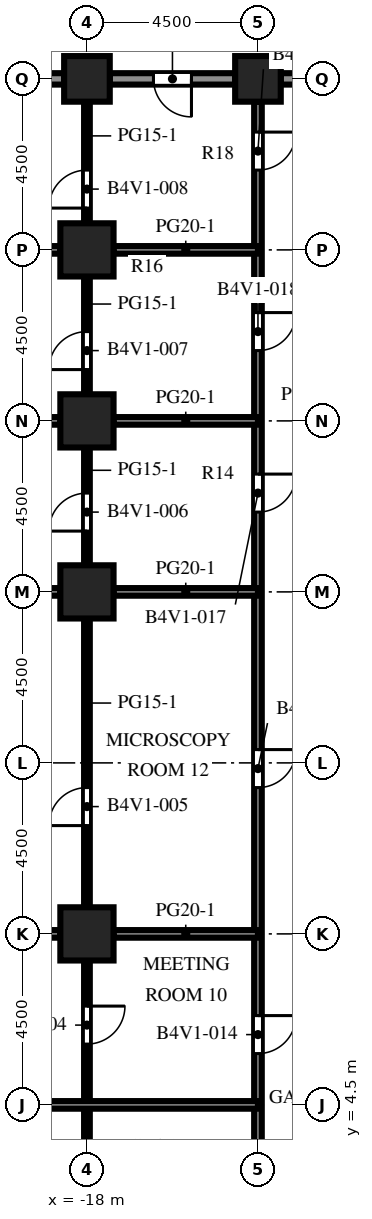
"""IFC4 building model, lengths in metres.
Left out: names, types, materials, properties, quantities, classifications, styles, units other than length and angle.
Written with IfcOpenShell. Run it as: python <this file> out.ifc"""

import sys

from ifc_helpers import new_model, si_unit, direction, frame, frame_2d, origin, origin_2d, place, context, subcontext, project, spatial, rectangle, extrude, element, fill, save


model = new_model("IFC4")
c1 = context("Model", 3, precision=1e-05, world=origin(), true_north=direction((0.0, 1.0)))
c2 = subcontext(c1, "Body", "Model", "MODEL_VIEW")
j1 = project(units=[si_unit("LENGTHUNIT", "METRE"), si_unit("PLANEANGLEUNIT", "RADIAN")], contexts=[c1])
p1 = place(None, origin())
s1 = spatial("IfcSite", under=j1, at=p1, CompositionType="ELEMENT")
p2 = place(p1, origin())
s2 = spatial("IfcBuilding", under=s1, at=p2, CompositionType="ELEMENT")
p3 = place(p2, frame((0.0, 0.0, 129.0)))
s3 = spatial("IfcBuildingStorey", under=s2, at=p3, CompositionType="ELEMENT", Elevation=129.0)
for number, where, z_axis, x_axis in (
    (1, (-18.0, 31.5, 0.0), (0.0, 0.0, 1.0), (1.0, 0.0, 0.0)),
    (2, (-13.5, 31.5, 0.0), (0.0, 0.0, 1.0), (1.0, 0.0, 0.0)),
):
    element("IfcColumn", number, at=place(p3, frame(where, z_axis=z_axis, x_axis=x_axis)), inside=s3, PredefinedType="COLUMN", context=c2, shape_type="SweptSolid", body=[
        extrude(rectangle(XDim=1.2, YDim=1.2, at=origin_2d()), origin(), (0.0, 0.0, 1.0), 4.1),
    ])
for number, where, z_axis, x_axis in (
    (3, (-18.0, 9.0, 0.0), (0.0, 0.0, 1.0), (1.0, 0.0, 0.0)),
    (4, (-18.0, 18.0, 0.0), (0.0, 0.0, 1.0), (1.0, 0.0, 0.0)),
    (5, (-18.0, 22.5, 0.0), (0.0, 0.0, 1.0), (1.0, 0.0, 0.0)),
    (6, (-18.0, 27.0, 0.0), (0.0, 0.0, 1.0), (1.0, 0.0, 0.0)),
):
    element("IfcColumn", number, at=place(p3, frame(where, z_axis=z_axis, x_axis=x_axis)), inside=s3, PredefinedType="COLUMN", context=c2, shape_type="SweptSolid", body=[
        extrude(rectangle(XDim=1.4, YDim=1.4, at=origin_2d()), origin(), (0.0, 0.0, 1.0), 4.1),
    ])
p4 = place(p3, frame((-12.9, 31.5, 0.0), z_axis=(0.0, 0.0, 1.0), x_axis=(1.0, 0.0, 0.0)))
e7 = element("IfcWall", 7, at=p4, inside=s3, PredefinedType="SOLIDWALL", context=c2, shape_type="SweptSolid", body=[
    extrude(rectangle(XDim=3.3, YDim=0.3, at=frame_2d((1.65, 0.0))), origin(), (0.0, 0.0, 1.0), 2.75),
])
p5 = place(p4, frame((0.525, 0.0, 0.8)))
e8 = element("IfcOpeningElement", 8, at=p5, cuts=e7, PredefinedType="OPENING", context=c2, shape_type="SweptSolid", body=[
    extrude(rectangle(XDim=1.2, YDim=1.7, at=frame_2d((0.6, 0.85))), frame((0.0, 0.16, 0.0), z_axis=(0.0, -1.0, 0.0), x_axis=(1.0, 0.0, 0.0)), (0.0, 0.0, 1.0), 0.32),
])
p6 = place(p3, frame((-17.4, 31.5, 0.0), z_axis=(0.0, 0.0, 1.0), x_axis=(1.0, 0.0, 0.0)))
e9 = element("IfcWall", 9, at=p6, inside=s3, PredefinedType="SOLIDWALL", context=c2, shape_type="SweptSolid", body=[
    extrude(rectangle(XDim=3.3, YDim=0.3, at=frame_2d((1.65, 0.0))), origin(), (0.0, 0.0, 1.0), 2.75),
])
p7 = place(p6, frame((1.15, 0.0, 0.0)))
e10 = element("IfcOpeningElement", 10, at=p7, cuts=e9, PredefinedType="OPENING", context=c2, shape_type="SweptSolid", body=[
    extrude(rectangle(XDim=1.0, YDim=2.2, at=frame_2d((0.5, 1.1))), frame((0.0, 0.16, 0.0), z_axis=(0.0, -1.0, 0.0), x_axis=(1.0, 0.0, 0.0)), (0.0, 0.0, 1.0), 0.32),
])
p8 = place(p3, frame((-21.9, 31.5, 0.0), z_axis=(0.0, 0.0, 1.0), x_axis=(1.0, 0.0, 0.0)))
e11 = element("IfcWall", 11, at=p8, inside=s3, PredefinedType="SOLIDWALL", context=c2, shape_type="SweptSolid", body=[
    extrude(rectangle(XDim=3.3, YDim=0.3, at=frame_2d((1.65, 0.0))), origin(), (0.0, 0.0, 1.0), 2.75),
])
p9 = place(p8, frame((0.45, 0.0, 0.8)))
e12 = element("IfcOpeningElement", 12, at=p9, cuts=e11, PredefinedType="OPENING", context=c2, shape_type="SweptSolid", body=[
    extrude(rectangle(XDim=2.4, YDim=1.7, at=frame_2d((1.2, 0.85))), frame((0.0, 0.16, 0.0), z_axis=(0.0, -1.0, 0.0), x_axis=(1.0, 0.0, 0.0)), (0.0, 0.0, 1.0), 0.32),
])
p10 = place(p3, frame((-18.0, 0.7, 0.0), z_axis=(0.0, 0.0, 1.0), x_axis=(0.0, 1.0, 0.0)))
e13 = element("IfcWall", 13, at=p10, inside=s3, PredefinedType="PARTITIONING", context=c2, shape_type="SweptSolid", body=[
    extrude(rectangle(XDim=7.6, YDim=0.15, at=frame_2d((3.8, 0.0))), origin(), (0.0, 0.0, 1.0), 3.65),
])
p11 = place(p10, frame((5.4, 0.0, 0.0)))
e14 = element("IfcOpeningElement", 14, at=p11, cuts=e13, PredefinedType="OPENING", context=c2, shape_type="SweptSolid", body=[
    extrude(rectangle(XDim=1.0, YDim=2.1, at=frame_2d((0.5, 1.05))), frame((0.0, 0.085, 0.0), z_axis=(0.0, -1.0, 0.0), x_axis=(1.0, 0.0, 0.0)), (0.0, 0.0, 1.0), 0.17),
])
p12 = place(p3, frame((-18.0, 9.7, 0.0), z_axis=(0.0, 0.0, 1.0), x_axis=(0.0, 1.0, 0.0)))
e15 = element("IfcWall", 15, at=p12, inside=s3, PredefinedType="PARTITIONING", context=c2, shape_type="SweptSolid", body=[
    extrude(rectangle(XDim=7.6, YDim=0.15, at=frame_2d((3.8, 0.0))), origin(), (0.0, 0.0, 1.0), 3.65),
])
p13 = place(p12, frame((2.15, 0.0, 0.0)))
e16 = element("IfcOpeningElement", 16, at=p13, cuts=e15, PredefinedType="OPENING", context=c2, shape_type="SweptSolid", body=[
    extrude(rectangle(XDim=1.0, YDim=2.1, at=frame_2d((0.5, 1.05))), frame((0.0, 0.085, 0.0), z_axis=(0.0, -1.0, 0.0), x_axis=(1.0, 0.0, 0.0)), (0.0, 0.0, 1.0), 0.17),
])
p14 = place(p3, frame((-18.0, 18.7, 0.0), z_axis=(0.0, 0.0, 1.0), x_axis=(0.0, 1.0, 0.0)))
e17 = element("IfcWall", 17, at=p14, inside=s3, PredefinedType="PARTITIONING", context=c2, shape_type="SweptSolid", body=[
    extrude(rectangle(XDim=3.1, YDim=0.15, at=frame_2d((1.55, 0.0))), origin(), (0.0, 0.0, 1.0), 3.65),
])
p15 = place(p14, frame((0.9, 0.0, 0.0)))
e18 = element("IfcOpeningElement", 18, at=p15, cuts=e17, PredefinedType="OPENING", context=c2, shape_type="SweptSolid", body=[
    extrude(rectangle(XDim=1.0, YDim=2.1, at=frame_2d((0.5, 1.05))), frame((0.0, 0.085, 0.0), z_axis=(0.0, -1.0, 0.0), x_axis=(1.0, 0.0, 0.0)), (0.0, 0.0, 1.0), 0.17),
])
p16 = place(p3, frame((-18.0, 23.2, 0.0), z_axis=(0.0, 0.0, 1.0), x_axis=(0.0, 1.0, 0.0)))
e19 = element("IfcWall", 19, at=p16, inside=s3, PredefinedType="PARTITIONING", context=c2, shape_type="SweptSolid", body=[
    extrude(rectangle(XDim=3.1, YDim=0.15, at=frame_2d((1.55, 0.0))), origin(), (0.0, 0.0, 1.0), 3.65),
])
p17 = place(p16, frame((0.65, 0.0, 0.0)))
e20 = element("IfcOpeningElement", 20, at=p17, cuts=e19, PredefinedType="OPENING", context=c2, shape_type="SweptSolid", body=[
    extrude(rectangle(XDim=1.0, YDim=2.1, at=frame_2d((0.5, 1.05))), frame((0.0, 0.085, 0.0), z_axis=(0.0, -1.0, 0.0), x_axis=(1.0, 0.0, 0.0)), (0.0, 0.0, 1.0), 0.17),
])
p18 = place(p3, frame((-18.0, 27.7, 0.0), z_axis=(0.0, 0.0, 1.0), x_axis=(0.0, 1.0, 0.0)))
e21 = element("IfcWall", 21, at=p18, inside=s3, PredefinedType="PARTITIONING", context=c2, shape_type="SweptSolid", body=[
    extrude(rectangle(XDim=3.2, YDim=0.15, at=frame_2d((1.6, 0.0))), origin(), (0.0, 0.0, 1.0), 3.65),
])
p19 = place(p18, frame((0.4, 0.0, 0.0)))
e22 = element("IfcOpeningElement", 22, at=p19, cuts=e21, PredefinedType="OPENING", context=c2, shape_type="SweptSolid", body=[
    extrude(rectangle(XDim=1.0, YDim=2.1, at=frame_2d((0.5, 1.05))), frame((0.0, 0.085, 0.0), z_axis=(0.0, -1.0, 0.0), x_axis=(1.0, 0.0, 0.0)), (0.0, 0.0, 1.0), 0.17),
])
p20 = place(p3, frame((-13.5, -21.9, 0.0), z_axis=(0.0, 0.0, 1.0), x_axis=(0.0, 1.0, 0.0)))
e23 = element("IfcWall", 23, at=p20, inside=s3, PredefinedType="PARTITIONING", context=c2, shape_type="SweptSolid", body=[
    extrude(rectangle(XDim=52.8, YDim=0.2, at=frame_2d((26.4, 0.0))), origin(), (0.0, 0.0, 1.0), 3.65),
])
p21 = place(p20, frame((3.25, 0.0, 0.0)))
e24 = element("IfcOpeningElement", 24, at=p21, cuts=e23, PredefinedType="OPENING", context=c2, shape_type="SweptSolid", body=[
    extrude(rectangle(XDim=1.0, YDim=2.1, at=frame_2d((0.5, 1.05))), frame((0.0, 0.11, 0.0), z_axis=(0.0, -1.0, 0.0), x_axis=(1.0, 0.0, 0.0)), (0.0, 0.0, 1.0), 0.22),
])
p22 = place(p20, frame((10.0, 0.0, 0.0)))
e25 = element("IfcOpeningElement", 25, at=p22, cuts=e23, PredefinedType="OPENING", context=c2, shape_type="SweptSolid", body=[
    extrude(rectangle(XDim=1.0, YDim=2.1, at=frame_2d((0.5, 1.05))), frame((0.0, 0.11, 0.0), z_axis=(0.0, -1.0, 0.0), x_axis=(1.0, 0.0, 0.0)), (0.0, 0.0, 1.0), 0.22),
])
p23 = place(p20, frame((21.0, 0.0, 0.0)))
e26 = element("IfcOpeningElement", 26, at=p23, cuts=e23, PredefinedType="OPENING", context=c2, shape_type="SweptSolid", body=[
    extrude(rectangle(XDim=1.0, YDim=2.1, at=frame_2d((0.5, 1.05))), frame((0.0, 0.11, 0.0), z_axis=(0.0, -1.0, 0.0), x_axis=(1.0, 0.0, 0.0)), (0.0, 0.0, 1.0), 0.22),
])
p24 = place(p20, frame((27.75, 0.0, 0.0)))
e27 = element("IfcOpeningElement", 27, at=p24, cuts=e23, PredefinedType="OPENING", context=c2, shape_type="SweptSolid", body=[
    extrude(rectangle(XDim=1.0, YDim=2.1, at=frame_2d((0.5, 1.05))), frame((0.0, 0.11, 0.0), z_axis=(0.0, -1.0, 0.0), x_axis=(1.0, 0.0, 0.0)), (0.0, 0.0, 1.0), 0.22),
])
p25 = place(p20, frame((34.75, 0.0, 0.0)))
e28 = element("IfcOpeningElement", 28, at=p25, cuts=e23, PredefinedType="OPENING", context=c2, shape_type="SweptSolid", body=[
    extrude(rectangle(XDim=1.0, YDim=2.1, at=frame_2d((0.5, 1.05))), frame((0.0, 0.11, 0.0), z_axis=(0.0, -1.0, 0.0), x_axis=(1.0, 0.0, 0.0)), (0.0, 0.0, 1.0), 0.22),
])
p26 = place(p20, frame((42.0, 0.0, 0.0)))
e29 = element("IfcOpeningElement", 29, at=p26, cuts=e23, PredefinedType="OPENING", context=c2, shape_type="SweptSolid", body=[
    extrude(rectangle(XDim=1.0, YDim=2.1, at=frame_2d((0.5, 1.05))), frame((0.0, 0.11, 0.0), z_axis=(0.0, -1.0, 0.0), x_axis=(1.0, 0.0, 0.0)), (0.0, 0.0, 1.0), 0.22),
])
p27 = place(p20, frame((46.25, 0.0, 0.0)))
e30 = element("IfcOpeningElement", 30, at=p27, cuts=e23, PredefinedType="OPENING", context=c2, shape_type="SweptSolid", body=[
    extrude(rectangle(XDim=1.0, YDim=2.1, at=frame_2d((0.5, 1.05))), frame((0.0, 0.11, 0.0), z_axis=(0.0, -1.0, 0.0), x_axis=(1.0, 0.0, 0.0)), (0.0, 0.0, 1.0), 0.22),
])
p28 = place(p20, frame((51.0, 0.0, 0.0)))
e31 = element("IfcOpeningElement", 31, at=p28, cuts=e23, PredefinedType="OPENING", context=c2, shape_type="SweptSolid", body=[
    extrude(rectangle(XDim=1.0, YDim=2.1, at=frame_2d((0.5, 1.05))), frame((0.0, 0.11, 0.0), z_axis=(0.0, -1.0, 0.0), x_axis=(1.0, 0.0, 0.0)), (0.0, 0.0, 1.0), 0.22),
])
p29 = place(p3, frame((-26.4, 4.5, 0.0), z_axis=(0.0, 0.0, 1.0), x_axis=(1.0, 0.0, 0.0)))
e32 = element("IfcWall", 32, at=p29, inside=s3, PredefinedType="PARTITIONING", context=c2, shape_type="SweptSolid", body=[
    extrude(rectangle(XDim=12.9, YDim=0.2, at=frame_2d((6.45, 0.0))), origin(), (0.0, 0.0, 1.0), 3.65),
])
p30 = place(p3, frame((-26.4, 9.0, 0.0), z_axis=(0.0, 0.0, 1.0), x_axis=(1.0, 0.0, 0.0)))
e33 = element("IfcWall", 33, at=p30, inside=s3, PredefinedType="PARTITIONING", context=c2, shape_type="SweptSolid", body=[
    extrude(rectangle(XDim=7.7, YDim=0.2, at=frame_2d((3.85, 0.0))), origin(), (0.0, 0.0, 1.0), 3.65),
])
p31 = place(p3, frame((-17.3, 9.0, 0.0), z_axis=(0.0, 0.0, 1.0), x_axis=(1.0, 0.0, 0.0)))
e34 = element("IfcWall", 34, at=p31, inside=s3, PredefinedType="PARTITIONING", context=c2, shape_type="SweptSolid", body=[
    extrude(rectangle(XDim=3.8, YDim=0.2, at=frame_2d((1.9, 0.0))), origin(), (0.0, 0.0, 1.0), 3.65),
])
p32 = place(p3, frame((-26.4, 18.0, 0.0), z_axis=(0.0, 0.0, 1.0), x_axis=(1.0, 0.0, 0.0)))
e35 = element("IfcWall", 35, at=p32, inside=s3, PredefinedType="PARTITIONING", context=c2, shape_type="SweptSolid", body=[
    extrude(rectangle(XDim=7.7, YDim=0.2, at=frame_2d((3.85, 0.0))), origin(), (0.0, 0.0, 1.0), 3.65),
])
p33 = place(p3, frame((-17.3, 18.0, 0.0), z_axis=(0.0, 0.0, 1.0), x_axis=(1.0, 0.0, 0.0)))
e36 = element("IfcWall", 36, at=p33, inside=s3, PredefinedType="PARTITIONING", context=c2, shape_type="SweptSolid", body=[
    extrude(rectangle(XDim=3.8, YDim=0.2, at=frame_2d((1.9, 0.0))), origin(), (0.0, 0.0, 1.0), 3.65),
])
p34 = place(p3, frame((-26.4, 22.5, 0.0), z_axis=(0.0, 0.0, 1.0), x_axis=(1.0, 0.0, 0.0)))
e37 = element("IfcWall", 37, at=p34, inside=s3, PredefinedType="PARTITIONING", context=c2, shape_type="SweptSolid", body=[
    extrude(rectangle(XDim=7.7, YDim=0.2, at=frame_2d((3.85, 0.0))), origin(), (0.0, 0.0, 1.0), 3.65),
])
p35 = place(p3, frame((-17.3, 22.5, 0.0), z_axis=(0.0, 0.0, 1.0), x_axis=(1.0, 0.0, 0.0)))
e38 = element("IfcWall", 38, at=p35, inside=s3, PredefinedType="PARTITIONING", context=c2, shape_type="SweptSolid", body=[
    extrude(rectangle(XDim=3.8, YDim=0.2, at=frame_2d((1.9, 0.0))), origin(), (0.0, 0.0, 1.0), 3.65),
])
p36 = place(p3, frame((-26.4, 27.0, 0.0), z_axis=(0.0, 0.0, 1.0), x_axis=(1.0, 0.0, 0.0)))
e39 = element("IfcWall", 39, at=p36, inside=s3, PredefinedType="PARTITIONING", context=c2, shape_type="SweptSolid", body=[
    extrude(rectangle(XDim=7.7, YDim=0.2, at=frame_2d((3.85, 0.0))), origin(), (0.0, 0.0, 1.0), 3.65),
])
p37 = place(p3, frame((-17.3, 27.0, 0.0), z_axis=(0.0, 0.0, 1.0), x_axis=(1.0, 0.0, 0.0)))
e40 = element("IfcWall", 40, at=p37, inside=s3, PredefinedType="PARTITIONING", context=c2, shape_type="SweptSolid", body=[
    extrude(rectangle(XDim=3.8, YDim=0.2, at=frame_2d((1.9, 0.0))), origin(), (0.0, 0.0, 1.0), 3.65),
])
p38 = place(p7, origin())
e41 = element("IfcDoor", 41, at=p38, inside=s3, OperationType="SINGLE_SWING_RIGHT", PredefinedType="DOOR", context=c2, shape_type="SweptSolid", body=[
    extrude(rectangle(XDim=1.0, YDim=2.2, at=frame_2d((0.5, 1.1))), frame((0.0, 0.025, 0.0), z_axis=(0.0, -1.0, 0.0), x_axis=(1.0, 0.0, 0.0)), (0.0, 0.0, 1.0), 0.05),
])
fill(e10, e41)
p39 = place(p11, origin())
e42 = element("IfcDoor", 42, at=p39, inside=s3, OperationType="SINGLE_SWING_RIGHT", PredefinedType="DOOR", context=c2, shape_type="SweptSolid", body=[
    extrude(rectangle(XDim=1.0, YDim=2.1, at=frame_2d((0.5, 1.05))), frame((0.0, 0.025, 0.0), z_axis=(0.0, -1.0, 0.0), x_axis=(1.0, 0.0, 0.0)), (0.0, 0.0, 1.0), 0.05),
])
fill(e14, e42)
p40 = place(p13, origin())
e43 = element("IfcDoor", 43, at=p40, inside=s3, OperationType="SINGLE_SWING_LEFT", PredefinedType="DOOR", context=c2, shape_type="SweptSolid", body=[
    extrude(rectangle(XDim=1.0, YDim=2.1, at=frame_2d((0.5, 1.05))), frame((0.0, 0.025, 0.0), z_axis=(0.0, -1.0, 0.0), x_axis=(1.0, 0.0, 0.0)), (0.0, 0.0, 1.0), 0.05),
])
fill(e16, e43)
p41 = place(p15, origin())
e44 = element("IfcDoor", 44, at=p41, inside=s3, OperationType="SINGLE_SWING_LEFT", PredefinedType="DOOR", context=c2, shape_type="SweptSolid", body=[
    extrude(rectangle(XDim=1.0, YDim=2.1, at=frame_2d((0.5, 1.05))), frame((0.0, 0.025, 0.0), z_axis=(0.0, -1.0, 0.0), x_axis=(1.0, 0.0, 0.0)), (0.0, 0.0, 1.0), 0.05),
])
fill(e18, e44)
p42 = place(p17, origin())
e45 = element("IfcDoor", 45, at=p42, inside=s3, OperationType="SINGLE_SWING_LEFT", PredefinedType="DOOR", context=c2, shape_type="SweptSolid", body=[
    extrude(rectangle(XDim=1.0, YDim=2.1, at=frame_2d((0.5, 1.05))), frame((0.0, 0.025, 0.0), z_axis=(0.0, -1.0, 0.0), x_axis=(1.0, 0.0, 0.0)), (0.0, 0.0, 1.0), 0.05),
])
fill(e20, e45)
p43 = place(p19, origin())
e46 = element("IfcDoor", 46, at=p43, inside=s3, OperationType="SINGLE_SWING_LEFT", PredefinedType="DOOR", context=c2, shape_type="SweptSolid", body=[
    extrude(rectangle(XDim=1.0, YDim=2.1, at=frame_2d((0.5, 1.05))), frame((0.0, 0.025, 0.0), z_axis=(0.0, -1.0, 0.0), x_axis=(1.0, 0.0, 0.0)), (0.0, 0.0, 1.0), 0.05),
])
fill(e22, e46)
p44 = place(p24, origin())
e47 = element("IfcDoor", 47, at=p44, inside=s3, OperationType="SINGLE_SWING_RIGHT", PredefinedType="DOOR", context=c2, shape_type="SweptSolid", body=[
    extrude(rectangle(XDim=1.0, YDim=2.1, at=frame_2d((0.5, 1.05))), frame((0.0, 0.025, 0.0), z_axis=(0.0, -1.0, 0.0), x_axis=(1.0, 0.0, 0.0)), (0.0, 0.0, 1.0), 0.05),
])
fill(e27, e47)
p45 = place(p25, origin())
e48 = element("IfcDoor", 48, at=p45, inside=s3, OperationType="SINGLE_SWING_RIGHT", PredefinedType="DOOR", context=c2, shape_type="SweptSolid", body=[
    extrude(rectangle(XDim=1.0, YDim=2.1, at=frame_2d((0.5, 1.05))), frame((0.0, 0.025, 0.0), z_axis=(0.0, -1.0, 0.0), x_axis=(1.0, 0.0, 0.0)), (0.0, 0.0, 1.0), 0.05),
])
fill(e28, e48)
p46 = place(p26, origin())
e49 = element("IfcDoor", 49, at=p46, inside=s3, OperationType="SINGLE_SWING_RIGHT", PredefinedType="DOOR", context=c2, shape_type="SweptSolid", body=[
    extrude(rectangle(XDim=1.0, YDim=2.1, at=frame_2d((0.5, 1.05))), frame((0.0, 0.025, 0.0), z_axis=(0.0, -1.0, 0.0), x_axis=(1.0, 0.0, 0.0)), (0.0, 0.0, 1.0), 0.05),
])
fill(e29, e49)
p47 = place(p27, origin())
e50 = element("IfcDoor", 50, at=p47, inside=s3, OperationType="SINGLE_SWING_RIGHT", PredefinedType="DOOR", context=c2, shape_type="SweptSolid", body=[
    extrude(rectangle(XDim=1.0, YDim=2.1, at=frame_2d((0.5, 1.05))), frame((0.0, 0.025, 0.0), z_axis=(0.0, -1.0, 0.0), x_axis=(1.0, 0.0, 0.0)), (0.0, 0.0, 1.0), 0.05),
])
fill(e30, e50)
p48 = place(p28, origin())
e51 = element("IfcDoor", 51, at=p48, inside=s3, OperationType="SINGLE_SWING_RIGHT", PredefinedType="DOOR", context=c2, shape_type="SweptSolid", body=[
    extrude(rectangle(XDim=1.0, YDim=2.1, at=frame_2d((0.5, 1.05))), frame((0.0, 0.025, 0.0), z_axis=(0.0, -1.0, 0.0), x_axis=(1.0, 0.0, 0.0)), (0.0, 0.0, 1.0), 0.05),
])
fill(e31, e51)
save(model, sys.argv[1])
